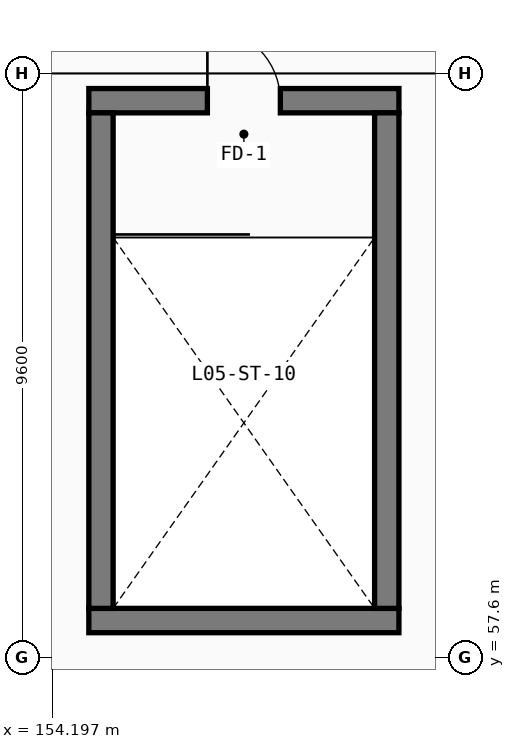
"""IFC4 building model, lengths in metres.
Left out: names, types, materials, properties, quantities, classifications, styles, units other than length and angle.
Written with IfcOpenShell. Run it as: python <this file> out.ifc"""

import sys

from ifc_helpers import new_model, si_unit, direction, frame, frame_2d, origin, place, context, subcontext, project, spatial, rectangle, extrude, element, fill, save


model = new_model("IFC4")
c1 = context("Model", 3, precision=1e-05, world=origin(), true_north=direction((0.0, 1.0)))
c2 = subcontext(c1, "Body", "Model", "MODEL_VIEW")
j1 = project(units=[si_unit("LENGTHUNIT", "METRE"), si_unit("PLANEANGLEUNIT", "RADIAN")], contexts=[c1])
p1 = place(None, origin())
s1 = spatial("IfcSite", under=j1, at=p1, CompositionType="ELEMENT")
p2 = place(p1, origin())
s2 = spatial("IfcBuilding", under=s1, at=p2, CompositionType="ELEMENT")
p3 = place(p2, frame((0.0, 0.0, 23.1)))
s3 = spatial("IfcBuildingStorey", under=s2, at=p3, CompositionType="ELEMENT", Elevation=23.1)
p4 = place(p3, frame((154.8, 58.2, 0.0), z_axis=(0.0, 0.0, 1.0), x_axis=(1.0, 0.0, 0.0)))
e1 = element("IfcWall", 1, at=p4, inside=s3, PredefinedType="SHEAR", context=c2, shape_type="SweptSolid", body=[
    extrude(rectangle(XDim=5.1, YDim=0.4, at=frame_2d((2.55, 0.0))), origin(), (0.0, 0.0, 1.0), 4.82),
])
p5 = place(p3, frame((159.9, 66.75, 0.0), z_axis=(0.0, 0.0, 1.0), x_axis=(-1.0, 0.0, 0.0)))
e2 = element("IfcWall", 2, at=p5, inside=s3, PredefinedType="SHEAR", context=c2, shape_type="SweptSolid", body=[
    extrude(rectangle(XDim=5.1, YDim=0.4, at=frame_2d((2.55, 0.0))), origin(), (0.0, 0.0, 1.0), 4.82),
])
p6 = place(p5, frame((3.15, 0.0, 0.0), z_axis=(0.0, 0.0, 1.0), x_axis=(-1.0, 0.0, 0.0)))
e3 = element("IfcOpeningElement", 3, at=p6, cuts=e2, PredefinedType="OPENING", context=c2, shape_type="SweptSolid", body=[
    extrude(rectangle(XDim=1.2, YDim=2.2, at=frame_2d((0.6, 1.1))), frame((0.0, 0.21, 0.0), z_axis=(0.0, -1.0, 0.0), x_axis=(1.0, 0.0, 0.0)), (0.0, 0.0, 1.0), 0.42),
])
for number, where, z_axis, x_axis in (
    (4, (155.0, 66.55, 0.0), (0.0, 0.0, 1.0), (0.0, -1.0, 0.0)),
    (5, (159.7, 58.4, 0.0), (0.0, 0.0, 1.0), (0.0, 1.0, 0.0)),
):
    element("IfcWall", number, at=place(p3, frame(where, z_axis=z_axis, x_axis=x_axis)), inside=s3, PredefinedType="SHEAR", context=c2, shape_type="SweptSolid", body=[
        extrude(rectangle(XDim=8.15, YDim=0.4, at=frame_2d((4.075, 0.0))), origin(), (0.0, 0.0, 1.0), 4.82),
    ])
p7 = place(p6, origin())
e6 = element("IfcDoor", 6, at=p7, inside=s3, OperationType="SINGLE_SWING_LEFT", PredefinedType="DOOR", context=c2, shape_type="SweptSolid", body=[
    extrude(rectangle(XDim=1.2, YDim=2.2, at=frame_2d((0.6, 1.1))), frame((0.0, 0.025, 0.0), z_axis=(0.0, -1.0, 0.0), x_axis=(1.0, 0.0, 0.0)), (0.0, 0.0, 1.0), 0.05),
])
fill(e3, e6)
save(model, sys.argv[1])
